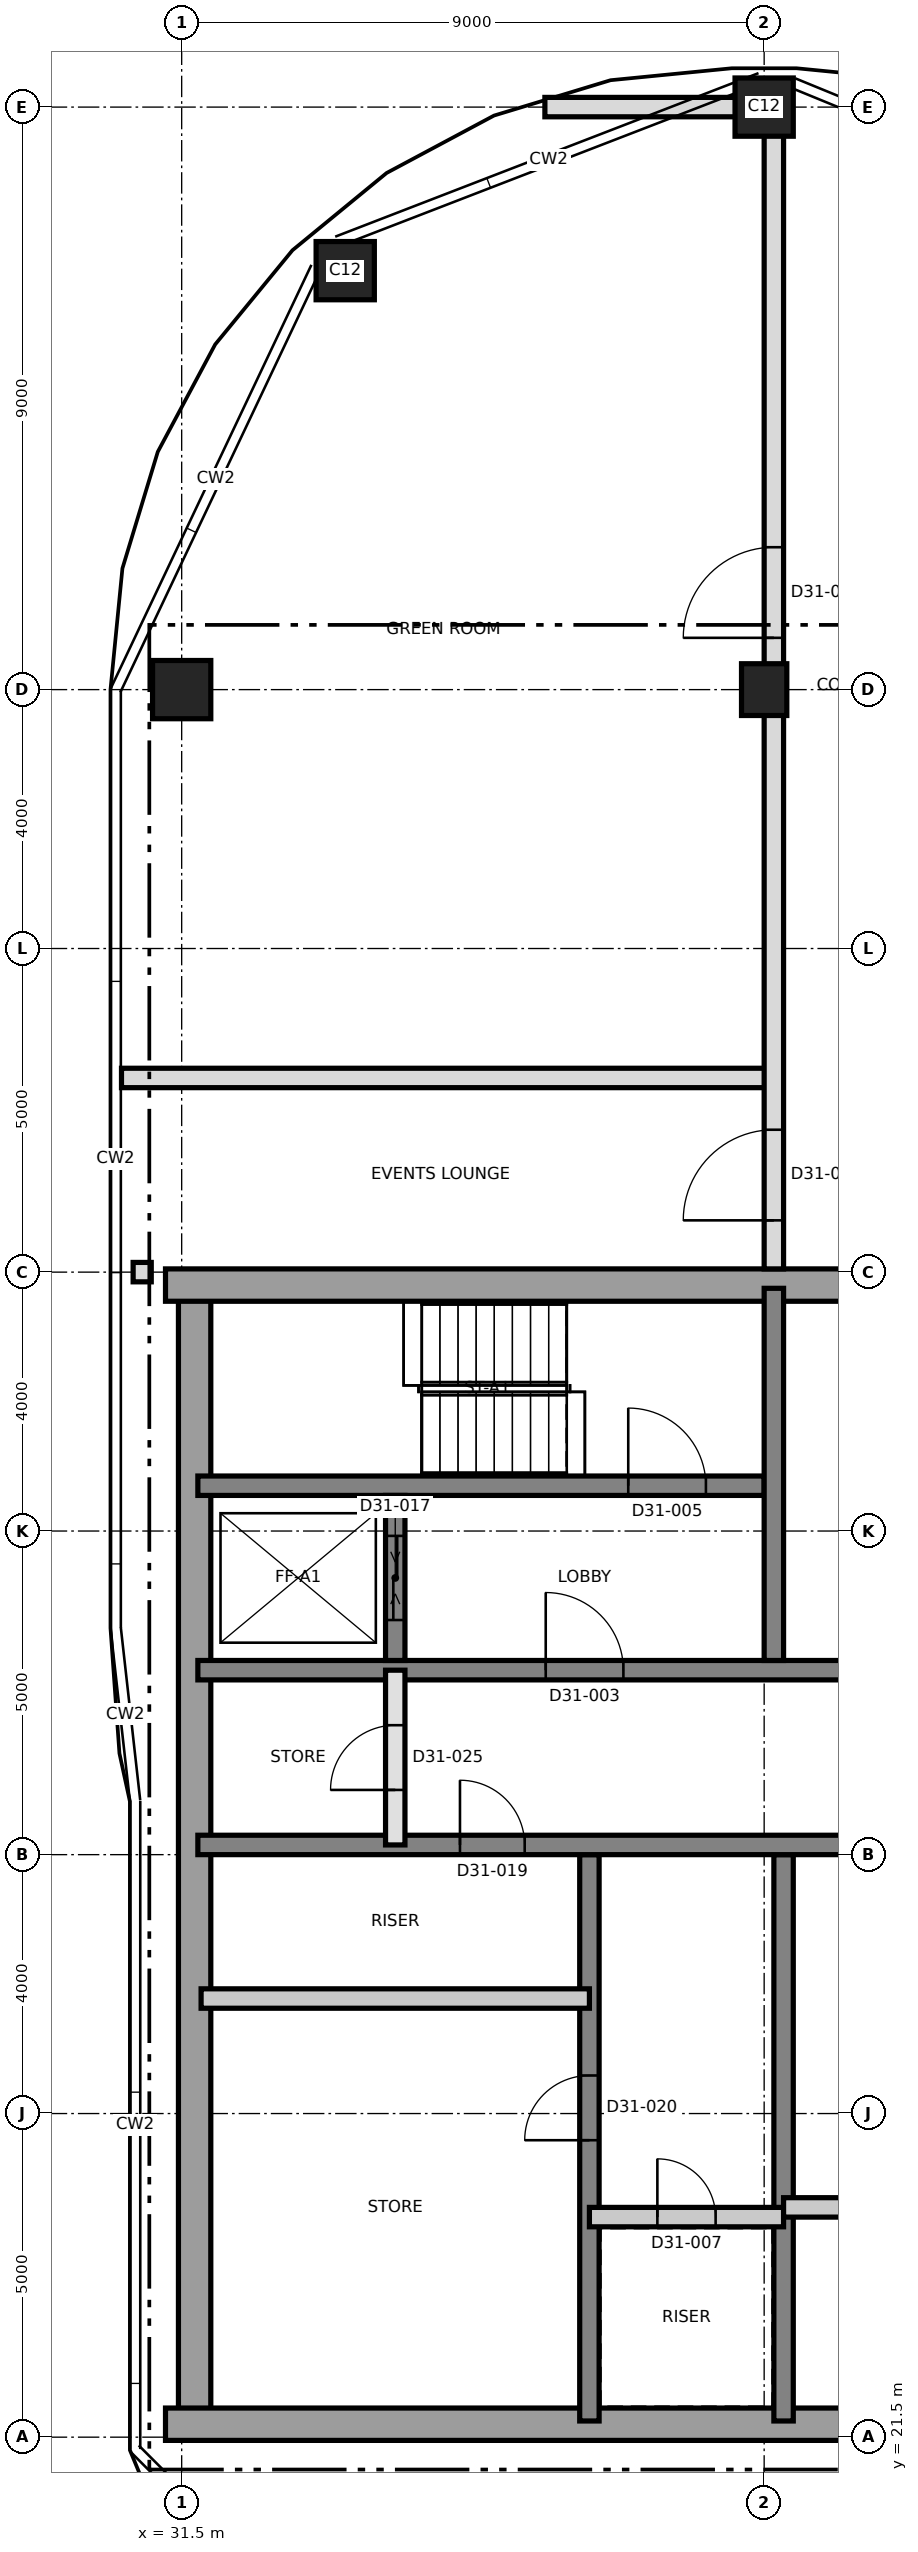
"""IFC4 building model, lengths in metres.
Left out: names, types, materials, properties, quantities, classifications, styles, units other than length and angle.
Written with IfcOpenShell. Run it as: python <this file> out.ifc"""

import sys

from ifc_helpers import new_model, si_unit, direction, frame, frame_2d, origin, origin_2d, place, context, subcontext, project, spatial, rectangle, extrude, element, fill, save


model = new_model("IFC4")
c1 = context("Model", 3, precision=1e-05, world=origin(), true_north=direction((0.0, 1.0)))
c2 = subcontext(c1, "Body", "Model", "MODEL_VIEW")
j1 = project(units=[si_unit("LENGTHUNIT", "METRE"), si_unit("PLANEANGLEUNIT", "RADIAN")], contexts=[c1])
p1 = place(None, origin())
s1 = spatial("IfcSite", under=j1, at=p1, CompositionType="ELEMENT")
p2 = place(p1, origin())
s2 = spatial("IfcBuilding", under=s1, at=p2, CompositionType="ELEMENT")
p3 = place(p2, frame((0.0, 0.0, 266.9)))
s3 = spatial("IfcBuildingStorey", under=s2, at=p3, CompositionType="ELEMENT", Elevation=266.9)
p4 = place(p3, frame((31.7, 21.75, 0.0), z_axis=(0.0, 0.0, 1.0), x_axis=(0.0, 1.0, 0.0)))
e1 = element("IfcWall", 1, at=p4, inside=s3, PredefinedType="SHEAR", context=c2, shape_type="SweptSolid", body=[
    extrude(rectangle(XDim=17.5, YDim=0.5, at=frame_2d((8.75, 0.0))), origin(), (0.0, 0.0, 1.0), 6.0),
])
p5 = place(p3, frame((31.25, 21.7, 0.0), z_axis=(0.0, 0.0, 1.0), x_axis=(1.0, 0.0, 0.0)))
e2 = element("IfcWall", 2, at=p5, inside=s3, PredefinedType="SHEAR", context=c2, shape_type="SweptSolid", body=[
    extrude(rectangle(XDim=27.0, YDim=0.5, at=frame_2d((13.5, 0.0))), origin(), (0.0, 0.0, 1.0), 6.0),
])
p6 = place(p3, frame((31.25, 39.3, 0.0), z_axis=(0.0, 0.0, 1.0), x_axis=(1.0, 0.0, 0.0)))
e3 = element("IfcWall", 3, at=p6, inside=s3, PredefinedType="SHEAR", context=c2, shape_type="SweptSolid", body=[
    extrude(rectangle(XDim=27.0, YDim=0.5, at=frame_2d((13.5, 0.0))), origin(), (0.0, 0.0, 1.0), 6.0),
])
p7 = place(p6, frame((10.45, 0.0, 0.0)))
e4 = element("IfcOpeningElement", 4, at=p7, cuts=e3, PredefinedType="OPENING", context=c2, shape_type="SweptSolid", body=[
    extrude(rectangle(XDim=1.2, YDim=2.1, at=frame_2d((0.6, 1.05))), frame((0.0, 0.26, 0.0), z_axis=(0.0, -1.0, 0.0), x_axis=(1.0, 0.0, 0.0)), (0.0, 0.0, 1.0), 0.52),
])
p8 = place(p3, frame((37.8, 21.75, 0.0), z_axis=(0.0, 0.0, 1.0), x_axis=(0.0, 1.0, 0.0)))
e5 = element("IfcWall", 5, at=p8, inside=s3, PredefinedType="SHEAR", context=c2, shape_type="SweptSolid", body=[
    extrude(rectangle(XDim=8.75, YDim=0.3, at=frame_2d((4.375, 0.0))), origin(), (0.0, 0.0, 1.0), 6.0),
])
p9 = place(p8, frame((4.338, 0.0, 0.0)))
e6 = element("IfcOpeningElement", 6, at=p9, cuts=e5, PredefinedType="OPENING", context=c2, shape_type="SweptSolid", body=[
    extrude(rectangle(XDim=1.0, YDim=2.1, at=frame_2d((0.5, 1.05))), frame((0.0, 0.16, 0.0), z_axis=(0.0, -1.0, 0.0), x_axis=(1.0, 0.0, 0.0)), (0.0, 0.0, 1.0), 0.32),
])
p10 = place(p3, frame((40.8, 21.75, 0.0), z_axis=(0.0, 0.0, 1.0), x_axis=(0.0, 1.0, 0.0)))
e7 = element("IfcWall", 7, at=p10, inside=s3, PredefinedType="SHEAR", context=c2, shape_type="SweptSolid", body=[
    extrude(rectangle(XDim=8.75, YDim=0.3, at=frame_2d((4.375, 0.0))), origin(), (0.0, 0.0, 1.0), 6.0),
])
p11 = place(p3, frame((31.75, 30.65, 0.0), z_axis=(0.0, 0.0, 1.0), x_axis=(1.0, 0.0, 0.0)))
e8 = element("IfcWall", 8, at=p11, inside=s3, PredefinedType="SHEAR", context=c2, shape_type="SweptSolid", body=[
    extrude(rectangle(XDim=26.5, YDim=0.3, at=frame_2d((13.25, 0.0))), origin(), (0.0, 0.0, 1.0), 6.0),
])
p12 = place(p11, frame((24.75, 0.0, 0.0)))
e9 = element("IfcOpeningElement", 9, at=p12, cuts=e8, PredefinedType="OPENING", context=c2, shape_type="SweptSolid", body=[
    extrude(rectangle(XDim=1.0, YDim=2.1, at=frame_2d((0.5, 1.05))), frame((0.0, 0.16, 0.0), z_axis=(0.0, -1.0, 0.0), x_axis=(1.0, 0.0, 0.0)), (0.0, 0.0, 1.0), 0.32),
])
p13 = place(p11, frame((4.05, 0.0, 0.0)))
e10 = element("IfcOpeningElement", 10, at=p13, cuts=e8, PredefinedType="OPENING", context=c2, shape_type="SweptSolid", body=[
    extrude(rectangle(XDim=1.0, YDim=2.1, at=frame_2d((0.5, 1.05))), frame((0.0, 0.16, 0.0), z_axis=(0.0, -1.0, 0.0), x_axis=(1.0, 0.0, 0.0)), (0.0, 0.0, 1.0), 0.32),
])
p14 = place(p11, frame((11.55, 0.0, 0.0)))
e11 = element("IfcOpeningElement", 11, at=p14, cuts=e8, PredefinedType="OPENING", context=c2, shape_type="SweptSolid", body=[
    extrude(rectangle(XDim=1.0, YDim=2.1, at=frame_2d((0.5, 1.05))), frame((0.0, 0.16, 0.0), z_axis=(0.0, -1.0, 0.0), x_axis=(1.0, 0.0, 0.0)), (0.0, 0.0, 1.0), 0.32),
])
p15 = place(p3, frame((31.75, 33.35, 0.0), z_axis=(0.0, 0.0, 1.0), x_axis=(1.0, 0.0, 0.0)))
e12 = element("IfcWall", 12, at=p15, inside=s3, PredefinedType="SHEAR", context=c2, shape_type="SweptSolid", body=[
    extrude(rectangle(XDim=26.5, YDim=0.3, at=frame_2d((13.25, 0.0))), origin(), (0.0, 0.0, 1.0), 6.0),
])
p16 = place(p15, frame((13.9, 0.0, 0.0)))
e13 = element("IfcOpeningElement", 13, at=p16, cuts=e12, PredefinedType="OPENING", context=c2, shape_type="SweptSolid", body=[
    extrude(rectangle(XDim=1.4, YDim=2.1, at=frame_2d((0.7, 1.05))), frame((0.0, 0.16, 0.0), z_axis=(0.0, -1.0, 0.0), x_axis=(1.0, 0.0, 0.0)), (0.0, 0.0, 1.0), 0.32),
])
p17 = place(p15, frame((5.375, 0.0, 0.0)))
e14 = element("IfcOpeningElement", 14, at=p17, cuts=e12, PredefinedType="OPENING", context=c2, shape_type="SweptSolid", body=[
    extrude(rectangle(XDim=1.2, YDim=2.1, at=frame_2d((0.6, 1.05))), frame((0.0, 0.16, 0.0), z_axis=(0.0, -1.0, 0.0), x_axis=(1.0, 0.0, 0.0)), (0.0, 0.0, 1.0), 0.32),
])
p18 = place(p15, frame((19.925, 0.0, 0.0)))
e15 = element("IfcOpeningElement", 15, at=p18, cuts=e12, PredefinedType="OPENING", context=c2, shape_type="SweptSolid", body=[
    extrude(rectangle(XDim=1.2, YDim=2.1, at=frame_2d((0.6, 1.05))), frame((0.0, 0.16, 0.0), z_axis=(0.0, -1.0, 0.0), x_axis=(1.0, 0.0, 0.0)), (0.0, 0.0, 1.0), 0.32),
])
p19 = place(p3, frame((31.75, 36.2, 0.0), z_axis=(0.0, 0.0, 1.0), x_axis=(1.0, 0.0, 0.0)))
e16 = element("IfcWall", 16, at=p19, inside=s3, PredefinedType="SHEAR", context=c2, shape_type="SweptSolid", body=[
    extrude(rectangle(XDim=8.75, YDim=0.3, at=frame_2d((4.375, 0.0))), origin(), (0.0, 0.0, 1.0), 6.0),
])
p20 = place(p19, frame((6.65, 0.0, 0.0)))
e17 = element("IfcOpeningElement", 17, at=p20, cuts=e16, PredefinedType="OPENING", context=c2, shape_type="SweptSolid", body=[
    extrude(rectangle(XDim=1.2, YDim=2.1, at=frame_2d((0.6, 1.05))), frame((0.0, 0.16, 0.0), z_axis=(0.0, -1.0, 0.0), x_axis=(1.0, 0.0, 0.0)), (0.0, 0.0, 1.0), 0.32),
])
p21 = place(p3, frame((40.65, 33.5, 0.0), z_axis=(0.0, 0.0, 1.0), x_axis=(0.0, 1.0, 0.0)))
e18 = element("IfcWall", 18, at=p21, inside=s3, PredefinedType="SHEAR", context=c2, shape_type="SweptSolid", body=[
    extrude(rectangle(XDim=5.75, YDim=0.3, at=frame_2d((2.875, 0.0))), origin(), (0.0, 0.0, 1.0), 6.0),
])
p22 = place(p3, frame((34.8, 33.5, 0.0), z_axis=(0.0, 0.0, 1.0), x_axis=(0.0, 1.0, 0.0)))
e19 = element("IfcWall", 19, at=p22, inside=s3, PredefinedType="SHEAR", context=c2, shape_type="SweptSolid", body=[
    extrude(rectangle(XDim=2.55, YDim=0.3, at=frame_2d((1.275, 0.0))), origin(), (0.0, 0.0, 1.0), 6.0),
])
p23 = place(p22, frame((0.625, 0.0, 0.0)))
e20 = element("IfcOpeningElement", 20, at=p23, cuts=e19, PredefinedType="OPENING", context=c2, shape_type="SweptSolid", body=[
    extrude(rectangle(XDim=1.3, YDim=2.4, at=frame_2d((0.65, 1.2))), frame((0.0, 0.16, 0.0), z_axis=(0.0, -1.0, 0.0), x_axis=(1.0, 0.0, 0.0)), (0.0, 0.0, 1.0), 0.32),
])
p24 = place(p3, frame((31.5, 48.5, 0.0), z_axis=(0.0, 0.0, 1.0), x_axis=(1.0, 0.0, 0.0)))
e21 = element("IfcColumn", 21, at=p24, inside=s3, PredefinedType="COLUMN", context=c2, shape_type="SweptSolid", body=[
    extrude(rectangle(XDim=0.9, YDim=0.9, at=origin_2d()), origin(), (0.0, 0.0, 1.0), 6.0),
])
p25 = place(p3, frame((40.5, 48.5, 0.0), z_axis=(0.0, 0.0, 1.0), x_axis=(0.0, 1.0, 0.0)))
e22 = element("IfcColumn", 22, at=p25, inside=s3, PredefinedType="COLUMN", context=c2, shape_type="SweptSolid", body=[
    extrude(rectangle(XDim=0.8, YDim=0.7, at=origin_2d()), origin(), (0.0, 0.0, 1.0), 6.0),
])
for number, where, z_axis, x_axis in (
    (23, (34.027, 54.973, 0.0), (0.0, 0.0, 1.0), (1.0, 0.0, 0.0)),
    (24, (40.5, 57.5, 0.0), (0.0, 0.0, 1.0), (1.0, 0.0, 0.0)),
):
    element("IfcColumn", number, at=place(p3, frame(where, z_axis=z_axis, x_axis=x_axis)), inside=s3, PredefinedType="COLUMN", context=c2, shape_type="SweptSolid", body=[
        extrude(rectangle(XDim=0.9, YDim=0.9, at=origin_2d()), origin(), (0.0, 0.0, 1.0), 6.0),
    ])
p26 = place(p3, frame((37.8, 24.9, 0.0), z_axis=(0.0, 0.0, 1.0), x_axis=(1.0, 0.0, 0.0)))
e25 = element("IfcWall", 25, at=p26, inside=s3, PredefinedType="PARTITIONING", context=c2, shape_type="SweptSolid", body=[
    extrude(rectangle(XDim=3.0, YDim=0.3, at=frame_2d((1.5, 0.0))), origin(), (0.0, 0.0, 1.0), 5.7),
])
p27 = place(p26, frame((1.05, 0.0, 0.0)))
e26 = element("IfcOpeningElement", 26, at=p27, cuts=e25, PredefinedType="OPENING", context=c2, shape_type="SweptSolid", body=[
    extrude(rectangle(XDim=0.9, YDim=2.1, at=frame_2d((0.45, 1.05))), frame((0.0, 0.16, 0.0), z_axis=(0.0, -1.0, 0.0), x_axis=(1.0, 0.0, 0.0)), (0.0, 0.0, 1.0), 0.32),
])
p28 = place(p3, frame((40.8, 25.05, 0.0), z_axis=(0.0, 0.0, 1.0), x_axis=(1.0, 0.0, 0.0)))
e27 = element("IfcWall", 27, at=p28, inside=s3, PredefinedType="PARTITIONING", context=c2, shape_type="SweptSolid", body=[
    extrude(rectangle(XDim=6.0, YDim=0.3, at=frame_2d((3.0, 0.0))), origin(), (0.0, 0.0, 1.0), 5.7),
])
p29 = place(p28, frame((2.5, 0.0, 0.0)))
e28 = element("IfcOpeningElement", 28, at=p29, cuts=e27, PredefinedType="OPENING", context=c2, shape_type="SweptSolid", body=[
    extrude(rectangle(XDim=1.0, YDim=2.1, at=frame_2d((0.5, 1.05))), frame((0.0, 0.16, 0.0), z_axis=(0.0, -1.0, 0.0), x_axis=(1.0, 0.0, 0.0)), (0.0, 0.0, 1.0), 0.32),
])
p30 = place(p3, frame((31.8, 28.277, 0.0), z_axis=(0.0, 0.0, 1.0), x_axis=(1.0, 0.0, 0.0)))
e29 = element("IfcWall", 29, at=p30, inside=s3, PredefinedType="PARTITIONING", context=c2, shape_type="SweptSolid", body=[
    extrude(rectangle(XDim=6.0, YDim=0.3, at=frame_2d((3.0, 0.0))), origin(), (0.0, 0.0, 1.0), 5.7),
])
p31 = place(p3, frame((34.8, 30.65, 0.0), z_axis=(0.0, 0.0, 1.0), x_axis=(0.0, 1.0, 0.0)))
e30 = element("IfcWall", 30, at=p31, inside=s3, PredefinedType="SOLIDWALL", context=c2, shape_type="SweptSolid", body=[
    extrude(rectangle(XDim=2.7, YDim=0.3, at=frame_2d((1.35, 0.0))), origin(), (0.0, 0.0, 1.0), 5.7),
])
p32 = place(p31, frame((0.85, 0.0, 0.0)))
e31 = element("IfcOpeningElement", 31, at=p32, cuts=e30, PredefinedType="OPENING", context=c2, shape_type="SweptSolid", body=[
    extrude(rectangle(XDim=1.0, YDim=2.1, at=frame_2d((0.5, 1.05))), frame((0.0, 0.16, 0.0), z_axis=(0.0, -1.0, 0.0), x_axis=(1.0, 0.0, 0.0)), (0.0, 0.0, 1.0), 0.32),
])
p33 = place(p3, frame((30.75, 39.5, 0.0), z_axis=(0.0, 0.0, 1.0), x_axis=(1.0, 0.0, 0.0)))
e32 = element("IfcWall", 32, at=p33, inside=s3, PredefinedType="PARTITIONING", context=c2, shape_type="SweptSolid", body=[
    extrude(rectangle(XDim=0.28, YDim=0.3, at=frame_2d((0.14, 0.0))), origin(), (0.0, 0.0, 1.0), 5.65),
])
p34 = place(p3, frame((30.57, 42.5, 0.0), z_axis=(0.0, 0.0, 1.0), x_axis=(1.0, 0.0, 0.0)))
e33 = element("IfcWall", 33, at=p34, inside=s3, PredefinedType="PARTITIONING", context=c2, shape_type="SweptSolid", body=[
    extrude(rectangle(XDim=10.08, YDim=0.3, at=frame_2d((5.04, 0.0))), origin(), (0.0, 0.0, 1.0), 5.65),
])
p35 = place(p3, frame((37.112, 57.5, 0.0), z_axis=(0.0, 0.0, 1.0), x_axis=(1.0, 0.0, 0.0)))
e34 = element("IfcWall", 34, at=p35, inside=s3, PredefinedType="PARTITIONING", context=c2, shape_type="SweptSolid", body=[
    extrude(rectangle(XDim=3.538, YDim=0.3, at=frame_2d((1.769, 0.0))), origin(), (0.0, 0.0, 1.0), 5.65),
])
p36 = place(p3, frame((40.65, 39.55, 0.0), z_axis=(0.0, 0.0, 1.0), x_axis=(0.0, 1.0, 0.0)))
e35 = element("IfcWall", 35, at=p36, inside=s3, PredefinedType="PARTITIONING", context=c2, shape_type="SweptSolid", body=[
    extrude(rectangle(XDim=18.2, YDim=0.3, at=frame_2d((9.1, 0.0))), origin(), (0.0, 0.0, 1.0), 5.65),
])
p37 = place(p36, frame((0.75, 0.0, 0.0)))
e36 = element("IfcOpeningElement", 36, at=p37, cuts=e35, PredefinedType="OPENING", context=c2, shape_type="SweptSolid", body=[
    extrude(rectangle(XDim=1.4, YDim=2.1, at=frame_2d((0.7, 1.05))), frame((0.0, 0.16, 0.0), z_axis=(0.0, -1.0, 0.0), x_axis=(1.0, 0.0, 0.0)), (0.0, 0.0, 1.0), 0.32),
])
p38 = place(p36, frame((9.75, 0.0, 0.0)))
e37 = element("IfcOpeningElement", 37, at=p38, cuts=e35, PredefinedType="OPENING", context=c2, shape_type="SweptSolid", body=[
    extrude(rectangle(XDim=1.4, YDim=2.1, at=frame_2d((0.7, 1.05))), frame((0.0, 0.16, 0.0), z_axis=(0.0, -1.0, 0.0), x_axis=(1.0, 0.0, 0.0)), (0.0, 0.0, 1.0), 0.32),
])
p39 = place(p17, origin())
e38 = element("IfcDoor", 38, at=p39, inside=s3, OperationType="SINGLE_SWING_LEFT", PredefinedType="DOOR", context=c2, shape_type="SweptSolid", body=[
    extrude(rectangle(XDim=1.2, YDim=2.1, at=frame_2d((0.6, 1.05))), frame((0.0, 0.025, 0.0), z_axis=(0.0, -1.0, 0.0), x_axis=(1.0, 0.0, 0.0)), (0.0, 0.0, 1.0), 0.05),
])
fill(e14, e38)
p40 = place(p20, origin())
e39 = element("IfcDoor", 39, at=p40, inside=s3, OperationType="SINGLE_SWING_RIGHT", PredefinedType="DOOR", context=c2, shape_type="SweptSolid", body=[
    extrude(rectangle(XDim=1.2, YDim=2.1, at=frame_2d((0.6, 1.05))), frame((0.0, 0.025, 0.0), z_axis=(0.0, -1.0, 0.0), x_axis=(1.0, 0.0, 0.0)), (0.0, 0.0, 1.0), 0.05),
])
fill(e17, e39)
p41 = place(p27, origin())
e40 = element("IfcDoor", 40, at=p41, inside=s3, OperationType="SINGLE_SWING_LEFT", PredefinedType="DOOR", context=c2, shape_type="SweptSolid", body=[
    extrude(rectangle(XDim=0.9, YDim=2.1, at=frame_2d((0.45, 1.05))), frame((0.0, 0.025, 0.0), z_axis=(0.0, -1.0, 0.0), x_axis=(1.0, 0.0, 0.0)), (0.0, 0.0, 1.0), 0.05),
])
fill(e26, e40)
p42 = place(p23, origin())
e41 = element("IfcDoor", 41, at=p42, inside=s3, OperationType="SLIDING_TO_LEFT", PredefinedType="DOOR", context=c2, shape_type="SweptSolid", body=[
    extrude(rectangle(XDim=1.3, YDim=2.4, at=frame_2d((0.65, 1.2))), frame((0.0, 0.025, 0.0), z_axis=(0.0, -1.0, 0.0), x_axis=(1.0, 0.0, 0.0)), (0.0, 0.0, 1.0), 0.05),
])
fill(e20, e41)
p43 = place(p13, origin())
e42 = element("IfcDoor", 42, at=p43, inside=s3, OperationType="SINGLE_SWING_LEFT", PredefinedType="DOOR", context=c2, shape_type="SweptSolid", body=[
    extrude(rectangle(XDim=1.0, YDim=2.1, at=frame_2d((0.5, 1.05))), frame((0.0, 0.025, 0.0), z_axis=(0.0, -1.0, 0.0), x_axis=(1.0, 0.0, 0.0)), (0.0, 0.0, 1.0), 0.05),
])
fill(e10, e42)
p44 = place(p9, origin())
e43 = element("IfcDoor", 43, at=p44, inside=s3, OperationType="SINGLE_SWING_RIGHT", PredefinedType="DOOR", context=c2, shape_type="SweptSolid", body=[
    extrude(rectangle(XDim=1.0, YDim=2.1, at=frame_2d((0.5, 1.05))), frame((0.0, 0.025, 0.0), z_axis=(0.0, -1.0, 0.0), x_axis=(1.0, 0.0, 0.0)), (0.0, 0.0, 1.0), 0.05),
])
fill(e6, e43)
p45 = place(p32, origin())
e44 = element("IfcDoor", 44, at=p45, inside=s3, OperationType="SINGLE_SWING_LEFT", PredefinedType="DOOR", context=c2, shape_type="SweptSolid", body=[
    extrude(rectangle(XDim=1.0, YDim=2.1, at=frame_2d((0.5, 1.05))), frame((0.0, 0.025, 0.0), z_axis=(0.0, -1.0, 0.0), x_axis=(1.0, 0.0, 0.0)), (0.0, 0.0, 1.0), 0.05),
])
fill(e31, e44)
p46 = place(p37, origin())
e45 = element("IfcDoor", 45, at=p46, inside=s3, OperationType="SINGLE_SWING_LEFT", PredefinedType="DOOR", context=c2, shape_type="SweptSolid", body=[
    extrude(rectangle(XDim=1.4, YDim=2.1, at=frame_2d((0.7, 1.05))), frame((0.0, 0.025, 0.0), z_axis=(0.0, -1.0, 0.0), x_axis=(1.0, 0.0, 0.0)), (0.0, 0.0, 1.0), 0.05),
])
fill(e36, e45)
p47 = place(p38, origin())
e46 = element("IfcDoor", 46, at=p47, inside=s3, OperationType="SINGLE_SWING_LEFT", PredefinedType="DOOR", context=c2, shape_type="SweptSolid", body=[
    extrude(rectangle(XDim=1.4, YDim=2.1, at=frame_2d((0.7, 1.05))), frame((0.0, 0.025, 0.0), z_axis=(0.0, -1.0, 0.0), x_axis=(1.0, 0.0, 0.0)), (0.0, 0.0, 1.0), 0.05),
])
fill(e37, e46)
save(model, sys.argv[1])
